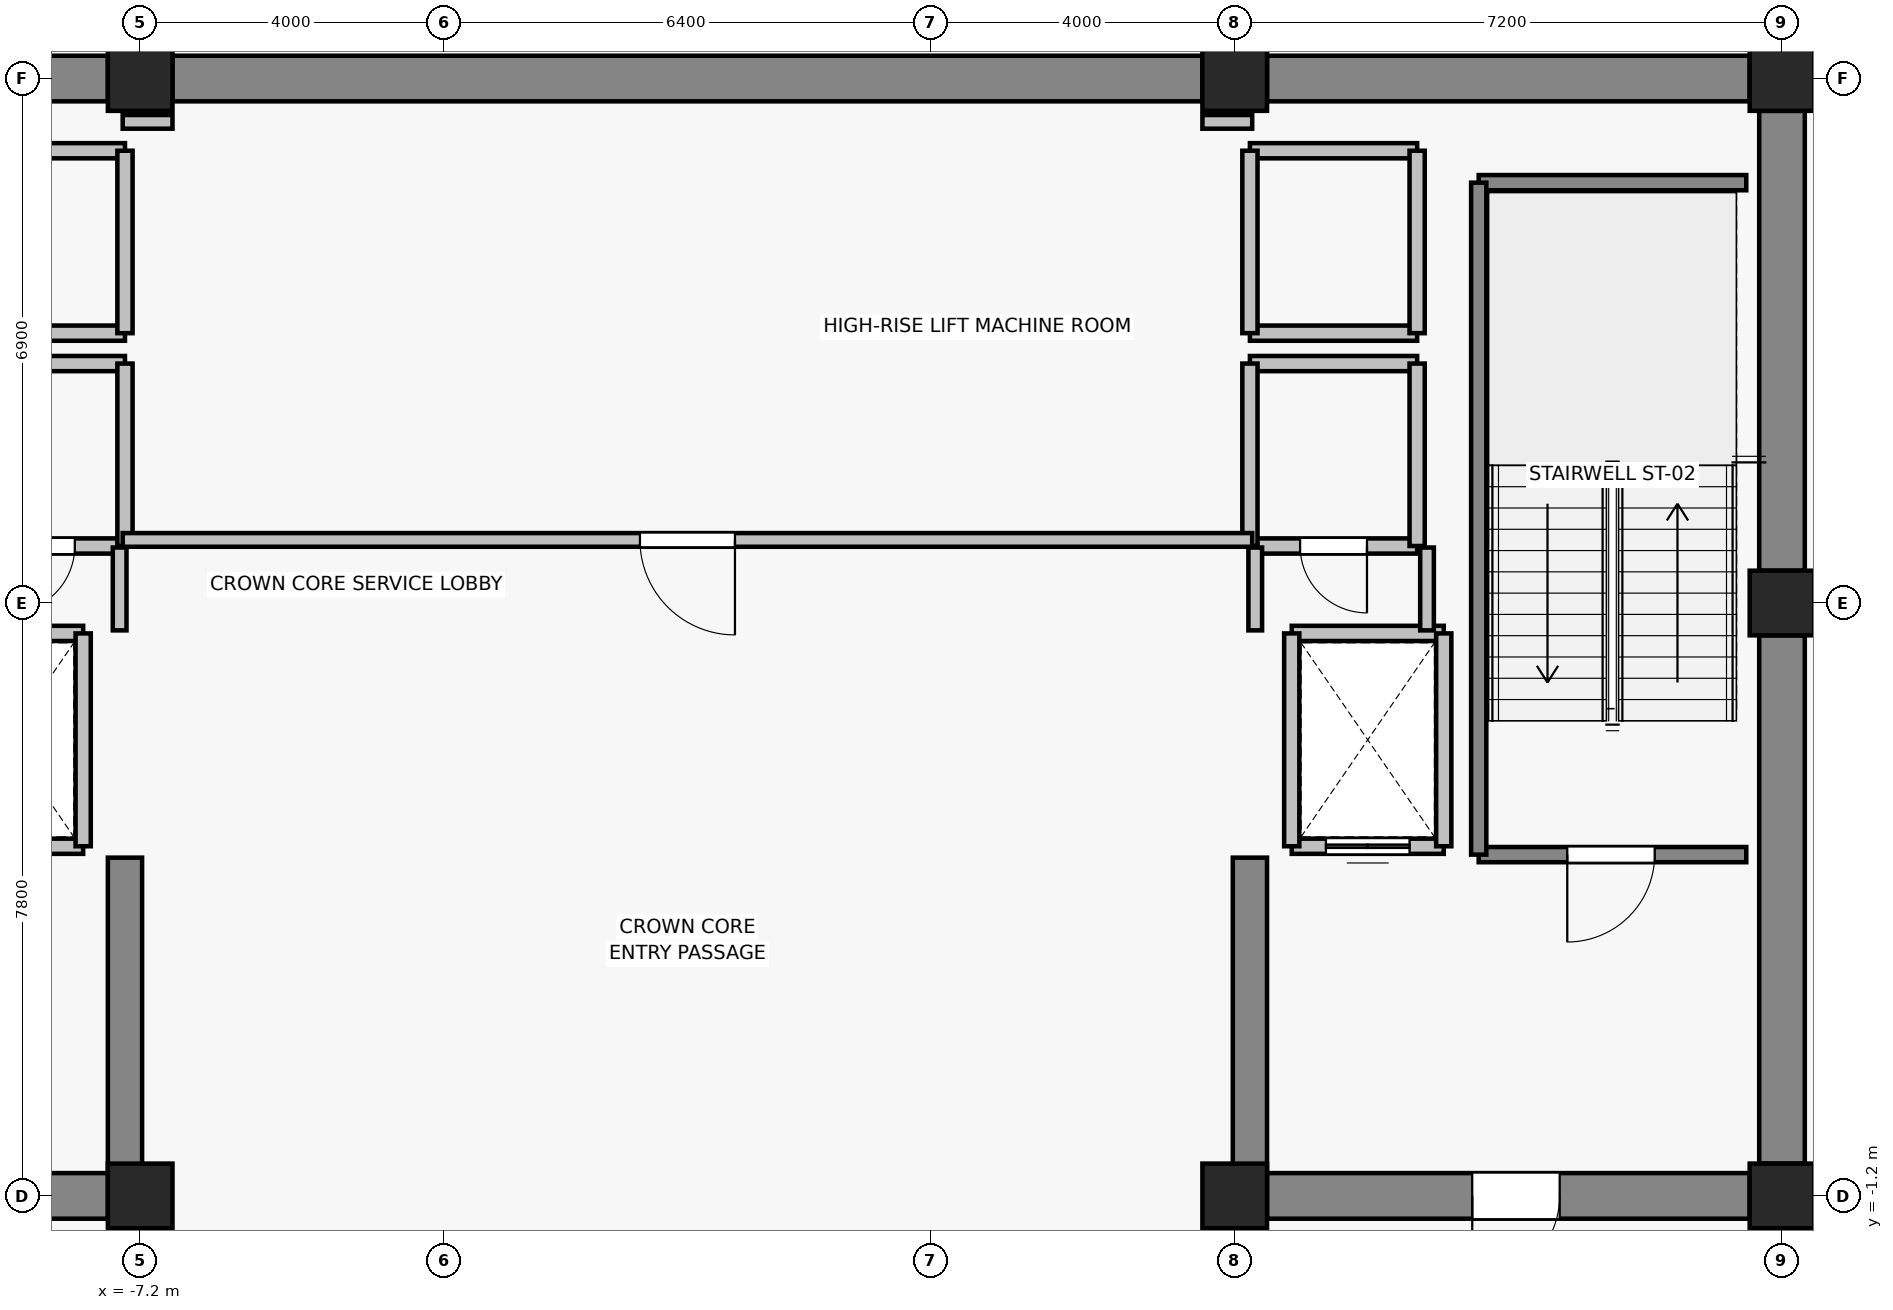
"""IFC4 building model, lengths in metres.
Left out: names, types, materials, properties, quantities, classifications, styles, units other than length and angle.
Written with IfcOpenShell. Run it as: python <this file> out.ifc"""

import sys

from ifc_helpers import new_model, si_unit, direction, frame, frame_2d, origin, origin_2d, place, context, subcontext, project, spatial, rectangle, extrude, source, transform, mapped, element, fill, save


model = new_model("IFC4")
c1 = context("Model", 3, precision=1e-05, world=origin(), true_north=direction((0.0, 1.0)))
c2 = subcontext(c1, "Body", "Model", "MODEL_VIEW")
j1 = project(units=[si_unit("LENGTHUNIT", "METRE"), si_unit("PLANEANGLEUNIT", "RADIAN")], contexts=[c1])
p1 = place(None, origin())
s1 = spatial("IfcSite", under=j1, at=p1, CompositionType="ELEMENT")
p2 = place(p1, origin())
s2 = spatial("IfcBuilding", under=s1, at=p2, CompositionType="ELEMENT")
p3 = place(p2, frame((0.0, 0.0, 271.6)))
s3 = spatial("IfcBuildingStorey", under=s2, at=p3, CompositionType="ELEMENT", Elevation=271.6)
for number, where, z_axis, x_axis in (
    (1, (-7.2, -1.2, 0.0), (0.0, 0.0, 1.0), (1.0, 0.0, 0.0)),
    (2, (7.2, -1.2, 0.0), (0.0, 0.0, 1.0), (1.0, 0.0, 0.0)),
    (3, (14.4, -1.2, 0.0), (0.0, 0.0, 1.0), (1.0, 0.0, 0.0)),
    (4, (14.4, 6.6, 0.0), (0.0, 0.0, 1.0), (1.0, 0.0, 0.0)),
    (5, (-7.2, 13.5, 0.0), (0.0, 0.0, 1.0), (1.0, 0.0, 0.0)),
    (6, (7.2, 13.5, 0.0), (0.0, 0.0, 1.0), (1.0, 0.0, 0.0)),
    (7, (14.4, 13.5, 0.0), (0.0, 0.0, 1.0), (1.0, 0.0, 0.0)),
):
    element("IfcColumn", number, at=place(p3, frame(where, z_axis=z_axis, x_axis=x_axis)), inside=s3, PredefinedType="COLUMN", context=c2, shape_type="SweptSolid", body=[
        extrude(rectangle(XDim=0.85, YDim=0.85, at=origin_2d()), origin(), (0.0, 0.0, 1.0), 4.6),
    ])
p4 = place(p3, frame((-13.975, 13.5, 0.0), z_axis=(0.0, 0.0, 1.0), x_axis=(1.0, 0.0, 0.0)))
e8 = element("IfcWall", 8, at=p4, inside=s3, PredefinedType="SHEAR", context=c2, shape_type="SweptSolid", body=[
    extrude(rectangle(XDim=6.35, YDim=0.6, at=frame_2d((3.175, 0.0))), origin(), (0.0, 0.0, 1.0), 4.38),
])
p5 = place(p3, frame((-6.775, 13.5, 0.0), z_axis=(0.0, 0.0, 1.0), x_axis=(1.0, 0.0, 0.0)))
e9 = element("IfcWall", 9, at=p5, inside=s3, PredefinedType="SHEAR", context=c2, shape_type="SweptSolid", body=[
    extrude(rectangle(XDim=13.55, YDim=0.6, at=frame_2d((6.775, 0.0))), origin(), (0.0, 0.0, 1.0), 4.38),
])
p6 = place(p3, frame((7.625, 13.5, 0.0), z_axis=(0.0, 0.0, 1.0), x_axis=(1.0, 0.0, 0.0)))
e10 = element("IfcWall", 10, at=p6, inside=s3, PredefinedType="SHEAR", context=c2, shape_type="SweptSolid", body=[
    extrude(rectangle(XDim=6.35, YDim=0.6, at=frame_2d((3.175, 0.0))), origin(), (0.0, 0.0, 1.0), 4.38),
])
p7 = place(p3, frame((14.4, -0.775, 0.0), z_axis=(0.0, 0.0, 1.0), x_axis=(0.0, 1.0, 0.0)))
e11 = element("IfcWall", 11, at=p7, inside=s3, PredefinedType="SHEAR", context=c2, shape_type="SweptSolid", body=[
    extrude(rectangle(XDim=6.95, YDim=0.6, at=frame_2d((3.475, 0.0))), origin(), (0.0, 0.0, 1.0), 4.38),
])
p8 = place(p3, frame((14.4, 7.025, 0.0), z_axis=(0.0, 0.0, 1.0), x_axis=(0.0, 1.0, 0.0)))
e12 = element("IfcWall", 12, at=p8, inside=s3, PredefinedType="SHEAR", context=c2, shape_type="SweptSolid", body=[
    extrude(rectangle(XDim=6.05, YDim=0.6, at=frame_2d((3.025, 0.0))), origin(), (0.0, 0.0, 1.0), 4.38),
])
p9 = place(p3, frame((-7.625, -1.2, 0.0), z_axis=(0.0, 0.0, 1.0), x_axis=(-1.0, 0.0, 0.0)))
e13 = element("IfcWall", 13, at=p9, inside=s3, PredefinedType="SHEAR", context=c2, shape_type="SweptSolid", body=[
    extrude(rectangle(XDim=6.35, YDim=0.6, at=frame_2d((3.175, 0.0))), origin(), (0.0, 0.0, 1.0), 4.38),
])
p10 = place(p9, frame((2.7, 0.0, 0.0)))
e14 = element("IfcOpeningElement", 14, at=p10, cuts=e13, PredefinedType="OPENING", context=c2, shape_type="SweptSolid", body=[
    extrude(rectangle(XDim=1.15, YDim=2.15, at=frame_2d((0.575, 1.075))), frame((0.0, 0.31, 0.0), z_axis=(0.0, -1.0, 0.0), x_axis=(1.0, 0.0, 0.0)), (0.0, 0.0, 1.0), 0.62),
])
p11 = place(p3, frame((13.975, -1.2, 0.0), z_axis=(0.0, 0.0, 1.0), x_axis=(-1.0, 0.0, 0.0)))
e15 = element("IfcWall", 15, at=p11, inside=s3, PredefinedType="SHEAR", context=c2, shape_type="SweptSolid", body=[
    extrude(rectangle(XDim=6.35, YDim=0.6, at=frame_2d((3.175, 0.0))), origin(), (0.0, 0.0, 1.0), 4.38),
])
p12 = place(p11, frame((2.5, 0.0, 0.0)))
e16 = element("IfcOpeningElement", 16, at=p12, cuts=e15, PredefinedType="OPENING", context=c2, shape_type="SweptSolid", body=[
    extrude(rectangle(XDim=1.15, YDim=2.15, at=frame_2d((0.575, 1.075))), frame((0.0, 0.31, 0.0), z_axis=(0.0, -1.0, 0.0), x_axis=(1.0, 0.0, 0.0)), (0.0, 0.0, 1.0), 0.62),
])
for number, where, z_axis, x_axis in (
    (17, (-7.4, -0.9, 0.0), (0.0, 0.0, 1.0), (0.0, 1.0, 0.0)),
    (18, (7.4, -0.9, 0.0), (0.0, 0.0, 1.0), (0.0, 1.0, 0.0)),
):
    element("IfcWall", number, at=place(p3, frame(where, z_axis=z_axis, x_axis=x_axis)), inside=s3, PredefinedType="SHEAR", context=c2, shape_type="SweptSolid", body=[
        extrude(rectangle(XDim=4.15, YDim=0.45, at=frame_2d((2.075, 0.0))), origin(), (0.0, 0.0, 1.0), 4.38),
    ])
p13 = place(p3, frame((-7.95, 3.4, 0.0), z_axis=(0.0, 0.0, 1.0), x_axis=(-1.0, 0.0, 0.0)))
e19 = element("IfcWall", 19, at=p13, inside=s3, PredefinedType="SOLIDWALL", context=c2, shape_type="SweptSolid", body=[
    extrude(rectangle(XDim=2.0, YDim=0.2, at=frame_2d((1.0, 0.0))), origin(), (0.0, 0.0, 1.0), 4.38),
])
p14 = place(p13, frame((0.45, 0.0, 0.0)))
e20 = element("IfcOpeningElement", 20, at=p14, cuts=e19, PredefinedType="OPENING", context=c2, shape_type="SweptSolid", body=[
    extrude(rectangle(XDim=1.1, YDim=2.2, at=frame_2d((0.55, 1.1))), frame((0.0, 0.11, 0.0), z_axis=(0.0, -1.0, 0.0), x_axis=(1.0, 0.0, 0.0)), (0.0, 0.0, 1.0), 0.22),
])
p15 = place(p3, frame((-9.95, 6.2, 0.0), z_axis=(0.0, 0.0, 1.0), x_axis=(1.0, 0.0, 0.0)))
e21 = element("IfcWall", 21, at=p15, inside=s3, PredefinedType="SOLIDWALL", context=c2, shape_type="SweptSolid", body=[
    extrude(rectangle(XDim=2.0, YDim=0.2, at=frame_2d((1.0, 0.0))), origin(), (0.0, 0.0, 1.0), 4.38),
])
p16 = place(p3, frame((-7.95, 6.2, 0.0), z_axis=(0.0, 0.0, 1.0), x_axis=(0.0, -1.0, 0.0)))
e22 = element("IfcWall", 22, at=p16, inside=s3, PredefinedType="SOLIDWALL", context=c2, shape_type="SweptSolid", body=[
    extrude(rectangle(XDim=2.8, YDim=0.2, at=frame_2d((1.4, 0.0))), origin(), (0.0, 0.0, 1.0), 4.38),
])
p17 = place(p3, frame((9.95, 3.4, 0.0), z_axis=(0.0, 0.0, 1.0), x_axis=(-1.0, 0.0, 0.0)))
e23 = element("IfcWall", 23, at=p17, inside=s3, PredefinedType="SOLIDWALL", context=c2, shape_type="SweptSolid", body=[
    extrude(rectangle(XDim=2.0, YDim=0.2, at=frame_2d((1.0, 0.0))), origin(), (0.0, 0.0, 1.0), 4.38),
])
p18 = place(p17, frame((0.45, 0.0, 0.0)))
e24 = element("IfcOpeningElement", 24, at=p18, cuts=e23, PredefinedType="OPENING", context=c2, shape_type="SweptSolid", body=[
    extrude(rectangle(XDim=1.1, YDim=2.2, at=frame_2d((0.55, 1.1))), frame((0.0, 0.11, 0.0), z_axis=(0.0, -1.0, 0.0), x_axis=(1.0, 0.0, 0.0)), (0.0, 0.0, 1.0), 0.22),
])
p19 = place(p3, frame((7.95, 6.2, 0.0), z_axis=(0.0, 0.0, 1.0), x_axis=(1.0, 0.0, 0.0)))
e25 = element("IfcWall", 25, at=p19, inside=s3, PredefinedType="SOLIDWALL", context=c2, shape_type="SweptSolid", body=[
    extrude(rectangle(XDim=2.0, YDim=0.2, at=frame_2d((1.0, 0.0))), origin(), (0.0, 0.0, 1.0), 4.38),
])
for number, where, z_axis, x_axis in (
    (26, (7.95, 3.4, 0.0), (0.0, 0.0, 1.0), (0.0, 1.0, 0.0)),
    (27, (9.95, 6.2, 0.0), (0.0, 0.0, 1.0), (0.0, -1.0, 0.0)),
):
    element("IfcWall", number, at=place(p3, frame(where, z_axis=z_axis, x_axis=x_axis)), inside=s3, PredefinedType="SOLIDWALL", context=c2, shape_type="SweptSolid", body=[
        extrude(rectangle(XDim=2.8, YDim=0.2, at=frame_2d((1.4, 0.0))), origin(), (0.0, 0.0, 1.0), 4.38),
    ])
p20 = place(p3, frame((-7.4, 7.35, 0.0), z_axis=(0.0, 0.0, 1.0), x_axis=(-1.0, 0.0, 0.0)))
e28 = element("IfcWall", 28, at=p20, inside=s3, PredefinedType="SOLIDWALL", context=c2, shape_type="SweptSolid", body=[
    extrude(rectangle(XDim=2.2, YDim=0.2, at=frame_2d((1.1, 0.0))), origin(), (0.0, 0.0, 1.0), 3.77),
])
p21 = place(p20, frame((0.66, 0.0, 0.0)))
e29 = element("IfcOpeningElement", 29, at=p21, cuts=e28, PredefinedType="OPENING", context=c2, shape_type="SweptSolid", body=[
    extrude(rectangle(XDim=0.88, YDim=2.1, at=frame_2d((0.44, 1.05))), frame((0.0, 0.11, 0.0), z_axis=(0.0, -1.0, 0.0), x_axis=(1.0, 0.0, 0.0)), (0.0, 0.0, 1.0), 0.22),
])
p22 = place(p3, frame((-9.6, 9.75, 0.0), z_axis=(0.0, 0.0, 1.0), x_axis=(1.0, 0.0, 0.0)))
e30 = element("IfcWall", 30, at=p22, inside=s3, PredefinedType="SOLIDWALL", context=c2, shape_type="SweptSolid", body=[
    extrude(rectangle(XDim=2.2, YDim=0.2, at=frame_2d((1.1, 0.0))), origin(), (0.0, 0.0, 1.0), 3.77),
])
p23 = place(p3, frame((-7.4, 9.75, 0.0), z_axis=(0.0, 0.0, 1.0), x_axis=(0.0, -1.0, 0.0)))
e31 = element("IfcWall", 31, at=p23, inside=s3, PredefinedType="SOLIDWALL", context=c2, shape_type="SweptSolid", body=[
    extrude(rectangle(XDim=2.4, YDim=0.2, at=frame_2d((1.2, 0.0))), origin(), (0.0, 0.0, 1.0), 3.77),
])
for number, where, z_axis, x_axis in (
    (32, (-7.4, 10.15, 0.0), (0.0, 0.0, 1.0), (-1.0, 0.0, 0.0)),
    (33, (-9.6, 12.55, 0.0), (0.0, 0.0, 1.0), (1.0, 0.0, 0.0)),
):
    element("IfcWall", number, at=place(p3, frame(where, z_axis=z_axis, x_axis=x_axis)), inside=s3, PredefinedType="SOLIDWALL", context=c2, shape_type="SweptSolid", body=[
        extrude(rectangle(XDim=2.2, YDim=0.2, at=frame_2d((1.1, 0.0))), origin(), (0.0, 0.0, 1.0), 3.77),
    ])
p24 = place(p3, frame((-7.4, 12.55, 0.0), z_axis=(0.0, 0.0, 1.0), x_axis=(0.0, -1.0, 0.0)))
e34 = element("IfcWall", 34, at=p24, inside=s3, PredefinedType="SOLIDWALL", context=c2, shape_type="SweptSolid", body=[
    extrude(rectangle(XDim=2.4, YDim=0.2, at=frame_2d((1.2, 0.0))), origin(), (0.0, 0.0, 1.0), 3.77),
])
p25 = place(p3, frame((9.6, 7.35, 0.0), z_axis=(0.0, 0.0, 1.0), x_axis=(-1.0, 0.0, 0.0)))
e35 = element("IfcWall", 35, at=p25, inside=s3, PredefinedType="SOLIDWALL", context=c2, shape_type="SweptSolid", body=[
    extrude(rectangle(XDim=2.2, YDim=0.2, at=frame_2d((1.1, 0.0))), origin(), (0.0, 0.0, 1.0), 3.77),
])
p26 = place(p25, frame((0.66, 0.0, 0.0)))
e36 = element("IfcOpeningElement", 36, at=p26, cuts=e35, PredefinedType="OPENING", context=c2, shape_type="SweptSolid", body=[
    extrude(rectangle(XDim=0.88, YDim=2.1, at=frame_2d((0.44, 1.05))), frame((0.0, 0.11, 0.0), z_axis=(0.0, -1.0, 0.0), x_axis=(1.0, 0.0, 0.0)), (0.0, 0.0, 1.0), 0.22),
])
p27 = place(p3, frame((7.4, 9.75, 0.0), z_axis=(0.0, 0.0, 1.0), x_axis=(1.0, 0.0, 0.0)))
e37 = element("IfcWall", 37, at=p27, inside=s3, PredefinedType="SOLIDWALL", context=c2, shape_type="SweptSolid", body=[
    extrude(rectangle(XDim=2.2, YDim=0.2, at=frame_2d((1.1, 0.0))), origin(), (0.0, 0.0, 1.0), 3.77),
])
p28 = place(p3, frame((7.4, 7.35, 0.0), z_axis=(0.0, 0.0, 1.0), x_axis=(0.0, 1.0, 0.0)))
e38 = element("IfcWall", 38, at=p28, inside=s3, PredefinedType="SOLIDWALL", context=c2, shape_type="SweptSolid", body=[
    extrude(rectangle(XDim=2.4, YDim=0.2, at=frame_2d((1.2, 0.0))), origin(), (0.0, 0.0, 1.0), 3.77),
])
p29 = place(p3, frame((9.6, 9.75, 0.0), z_axis=(0.0, 0.0, 1.0), x_axis=(0.0, -1.0, 0.0)))
e39 = element("IfcWall", 39, at=p29, inside=s3, PredefinedType="SOLIDWALL", context=c2, shape_type="SweptSolid", body=[
    extrude(rectangle(XDim=2.4, YDim=0.2, at=frame_2d((1.2, 0.0))), origin(), (0.0, 0.0, 1.0), 4.38),
])
for number, where, z_axis, x_axis in (
    (40, (9.6, 10.15, 0.0), (0.0, 0.0, 1.0), (-1.0, 0.0, 0.0)),
    (41, (7.4, 12.55, 0.0), (0.0, 0.0, 1.0), (1.0, 0.0, 0.0)),
):
    element("IfcWall", number, at=place(p3, frame(where, z_axis=z_axis, x_axis=x_axis)), inside=s3, PredefinedType="SOLIDWALL", context=c2, shape_type="SweptSolid", body=[
        extrude(rectangle(XDim=2.2, YDim=0.2, at=frame_2d((1.1, 0.0))), origin(), (0.0, 0.0, 1.0), 3.77),
    ])
p30 = place(p3, frame((7.4, 10.15, 0.0), z_axis=(0.0, 0.0, 1.0), x_axis=(0.0, 1.0, 0.0)))
e42 = element("IfcWall", 42, at=p30, inside=s3, PredefinedType="SOLIDWALL", context=c2, shape_type="SweptSolid", body=[
    extrude(rectangle(XDim=2.4, YDim=0.2, at=frame_2d((1.2, 0.0))), origin(), (0.0, 0.0, 1.0), 3.77),
])
p31 = place(p3, frame((9.6, 12.55, 0.0), z_axis=(0.0, 0.0, 1.0), x_axis=(0.0, -1.0, 0.0)))
e43 = element("IfcWall", 43, at=p31, inside=s3, PredefinedType="SOLIDWALL", context=c2, shape_type="SweptSolid", body=[
    extrude(rectangle(XDim=2.4, YDim=0.2, at=frame_2d((1.2, 0.0))), origin(), (0.0, 0.0, 1.0), 4.38),
])
p32 = place(p3, frame((13.93, 3.29, 0.0), z_axis=(0.0, 0.0, 1.0), x_axis=(-1.0, 0.0, 0.0)))
e44 = element("IfcWall", 44, at=p32, inside=s3, PredefinedType="SOLIDWALL", context=c2, shape_type="SweptSolid", body=[
    extrude(rectangle(XDim=3.52, YDim=0.2, at=frame_2d((1.76, 0.0))), origin(), (0.0, 0.0, 1.0), 4.38),
])
p33 = place(p32, frame((1.205, 0.0, 0.0)))
e45 = element("IfcOpeningElement", 45, at=p33, cuts=e44, PredefinedType="OPENING", context=c2, shape_type="SweptSolid", body=[
    extrude(rectangle(XDim=1.15, YDim=2.15, at=frame_2d((0.575, 1.075))), frame((0.0, 0.11, 0.0), z_axis=(0.0, -1.0, 0.0), x_axis=(1.0, 0.0, 0.0)), (0.0, 0.0, 1.0), 0.22),
])
p34 = place(p3, frame((10.41, 12.13, 0.0), z_axis=(0.0, 0.0, 1.0), x_axis=(1.0, 0.0, 0.0)))
e46 = element("IfcWall", 46, at=p34, inside=s3, PredefinedType="SOLIDWALL", context=c2, shape_type="SweptSolid", body=[
    extrude(rectangle(XDim=3.52, YDim=0.2, at=frame_2d((1.76, 0.0))), origin(), (0.0, 0.0, 1.0), 4.38),
])
p35 = place(p3, frame((10.41, 3.29, 0.0), z_axis=(0.0, 0.0, 1.0), x_axis=(0.0, 1.0, 0.0)))
e47 = element("IfcWall", 47, at=p35, inside=s3, PredefinedType="SOLIDWALL", context=c2, shape_type="SweptSolid", body=[
    extrude(rectangle(XDim=8.84, YDim=0.2, at=frame_2d((4.42, 0.0))), origin(), (0.0, 0.0, 1.0), 4.38),
])
p36 = place(p3, frame((7.43, 7.43, 0.0), z_axis=(0.0, 0.0, 1.0), x_axis=(-1.0, 0.0, 0.0)))
e48 = element("IfcWall", 48, at=p36, inside=s3, PredefinedType="PARTITIONING", context=c2, shape_type="SweptSolid", body=[
    extrude(rectangle(XDim=14.86, YDim=0.18, at=frame_2d((7.43, 0.0))), origin(), (0.0, 0.0, 1.0), 3.77),
])
p37 = place(p36, frame((6.805, 0.0, 0.0)))
e49 = element("IfcOpeningElement", 49, at=p37, cuts=e48, PredefinedType="OPENING", context=c2, shape_type="SweptSolid", body=[
    extrude(rectangle(XDim=1.25, YDim=2.15, at=frame_2d((0.625, 1.075))), frame((0.0, 0.1, 0.0), z_axis=(0.0, -1.0, 0.0), x_axis=(1.0, 0.0, 0.0)), (0.0, 0.0, 1.0), 0.2),
])
for number, where, z_axis, x_axis in (
    (50, (-7.43, 12.93, 0.0), (0.0, 0.0, 1.0), (1.0, 0.0, 0.0)),
    (51, (6.775, 12.93, 0.0), (0.0, 0.0, 1.0), (1.0, 0.0, 0.0)),
):
    element("IfcWall", number, at=place(p3, frame(where, z_axis=z_axis, x_axis=x_axis)), inside=s3, PredefinedType="PARTITIONING", context=c2, shape_type="SweptSolid", body=[
        extrude(rectangle(XDim=0.655, YDim=0.18, at=frame_2d((0.328, 0.0))), origin(), (0.0, 0.0, 1.0), 3.77),
    ])
for number, where, z_axis, x_axis in (
    (52, (-7.47, 7.33, 0.0), (0.0, 0.0, 1.0), (0.0, -1.0, 0.0)),
    (53, (7.47, 6.24, 0.0), (0.0, 0.0, 1.0), (0.0, 1.0, 0.0)),
):
    element("IfcWall", number, at=place(p3, frame(where, z_axis=z_axis, x_axis=x_axis)), inside=s3, PredefinedType="PARTITIONING", context=c2, shape_type="SweptSolid", body=[
        extrude(rectangle(XDim=1.09, YDim=0.18, at=frame_2d((0.545, 0.0))), origin(), (0.0, 0.0, 1.0), 3.77),
    ])
p38 = place(p3, frame((9.73, 7.33, 0.0), z_axis=(0.0, 0.0, 1.0), x_axis=(0.0, -1.0, 0.0)))
e54 = element("IfcWall", 54, at=p38, inside=s3, PredefinedType="PARTITIONING", context=c2, shape_type="SweptSolid", body=[
    extrude(rectangle(XDim=1.09, YDim=0.18, at=frame_2d((0.545, 0.0))), origin(), (0.0, 0.0, 1.0), 4.38),
])
m1 = source(origin(), c2, "Body", "SweptSolid", [
    extrude(rectangle(XDim=1.1, YDim=2.2, at=frame_2d((0.55, 1.1))), frame((0.0, 0.025, 0.0), z_axis=(0.0, -1.0, 0.0), x_axis=(1.0, 0.0, 0.0)), (0.0, 0.0, 1.0), 0.05),
])
p39 = place(p18, origin())
e55 = element("IfcDoor", 55, at=p39, inside=s3, OperationType="DOUBLE_DOOR_SLIDING", PredefinedType="DOOR", context=c2, shape_type="MappedRepresentation", body=[
    mapped(m1, transform((0.0, 0.0, 0.0), x_axis=(1.0, 0.0, 0.0), y_axis=(0.0, 1.0, 0.0), z_axis=(0.0, 0.0, 1.0), scale=1.0)),
])
fill(e24, e55)
m2 = source(origin(), c2, "Body", "SweptSolid", [
    extrude(rectangle(XDim=1.15, YDim=2.15, at=frame_2d((0.575, 1.075))), frame((0.0, 0.025, 0.0), z_axis=(0.0, -1.0, 0.0), x_axis=(1.0, 0.0, 0.0)), (0.0, 0.0, 1.0), 0.05),
])
p40 = place(p33, origin())
e56 = element("IfcDoor", 56, at=p40, inside=s3, OperationType="SINGLE_SWING_RIGHT", PredefinedType="DOOR", context=c2, shape_type="MappedRepresentation", body=[
    mapped(m2, transform((0.0, 0.0, 0.0), x_axis=(1.0, 0.0, 0.0), y_axis=(0.0, 1.0, 0.0), z_axis=(0.0, 0.0, 1.0), scale=1.0)),
])
fill(e45, e56)
p41 = place(p12, origin())
e57 = element("IfcDoor", 57, at=p41, inside=s3, OperationType="SINGLE_SWING_RIGHT", PredefinedType="DOOR", context=c2, shape_type="MappedRepresentation", body=[
    mapped(m2, transform((0.0, 0.0, 0.0), x_axis=(1.0, 0.0, 0.0), y_axis=(0.0, 1.0, 0.0), z_axis=(0.0, 0.0, 1.0), scale=1.0)),
])
fill(e16, e57)
m3 = source(origin(), c2, "Body", "SweptSolid", [
    extrude(rectangle(XDim=1.25, YDim=2.15, at=frame_2d((0.625, 1.075))), frame((0.0, 0.025, 0.0), z_axis=(0.0, -1.0, 0.0), x_axis=(1.0, 0.0, 0.0)), (0.0, 0.0, 1.0), 0.05),
])
p42 = place(p37, origin())
e58 = element("IfcDoor", 58, at=p42, inside=s3, OperationType="SINGLE_SWING_LEFT", PredefinedType="DOOR", context=c2, shape_type="MappedRepresentation", body=[
    mapped(m3, transform((0.0, 0.0, 0.0), x_axis=(1.0, 0.0, 0.0), y_axis=(0.0, 1.0, 0.0), z_axis=(0.0, 0.0, 1.0), scale=1.0)),
])
fill(e49, e58)
m4 = source(origin(), c2, "Body", "SweptSolid", [
    extrude(rectangle(XDim=0.88, YDim=2.1, at=frame_2d((0.44, 1.05))), frame((0.0, 0.025, 0.0), z_axis=(0.0, -1.0, 0.0), x_axis=(1.0, 0.0, 0.0)), (0.0, 0.0, 1.0), 0.05),
])
p43 = place(p21, origin())
e59 = element("IfcDoor", 59, at=p43, inside=s3, OperationType="SINGLE_SWING_RIGHT", PredefinedType="DOOR", context=c2, shape_type="MappedRepresentation", body=[
    mapped(m4, transform((0.0, 0.0, 0.0), x_axis=(1.0, 0.0, 0.0), y_axis=(0.0, 1.0, 0.0), z_axis=(0.0, 0.0, 1.0), scale=1.0)),
])
fill(e29, e59)
p44 = place(p26, origin())
e60 = element("IfcDoor", 60, at=p44, inside=s3, OperationType="SINGLE_SWING_LEFT", PredefinedType="DOOR", context=c2, shape_type="MappedRepresentation", body=[
    mapped(m4, transform((0.0, 0.0, 0.0), x_axis=(1.0, 0.0, 0.0), y_axis=(0.0, 1.0, 0.0), z_axis=(0.0, 0.0, 1.0), scale=1.0)),
])
fill(e36, e60)
save(model, sys.argv[1])
